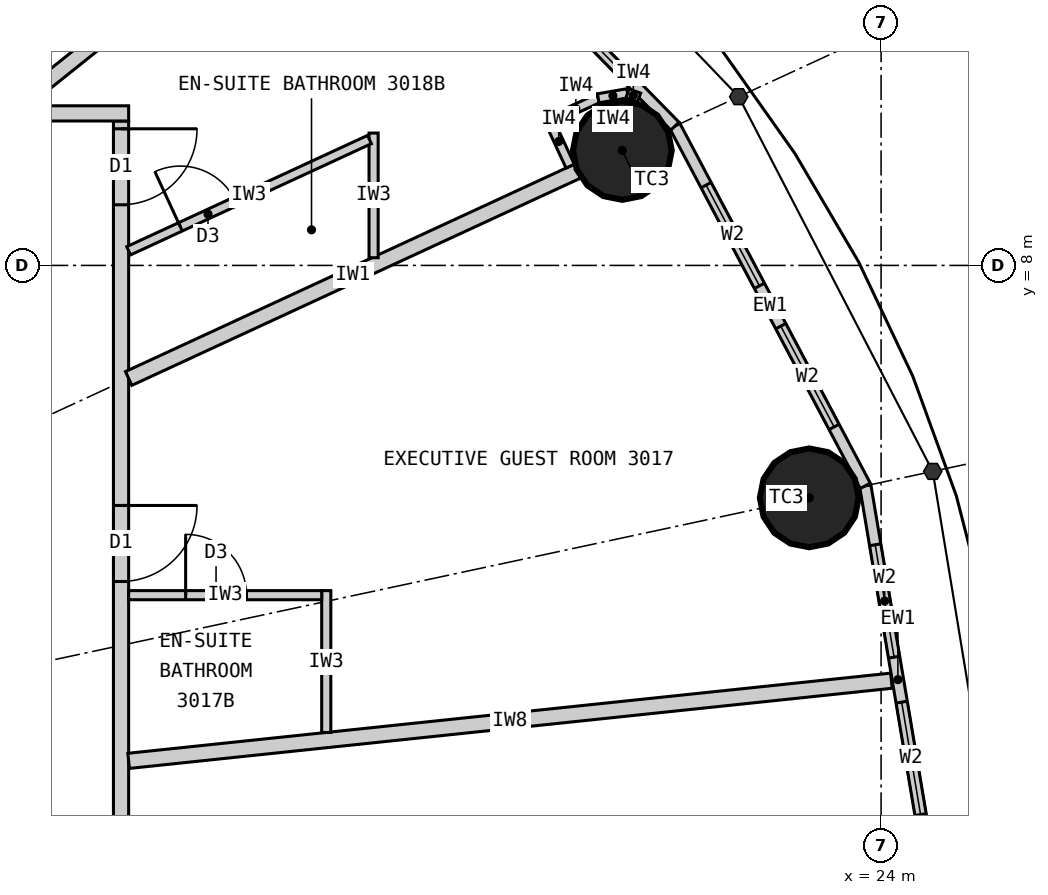
"""IFC4 building model, lengths in metres.
Left out: names, types, materials, properties, quantities, classifications, styles, units other than length and angle.
Written with IfcOpenShell. Run it as: python <this file> out.ifc"""

import sys

from ifc_helpers import new_model, si_unit, direction, frame, frame_2d, origin, origin_2d, place, context, subcontext, project, spatial, rectangle, circle, extrude, element, fill, save


model = new_model("IFC4")
c1 = context("Model", 3, precision=1e-05, world=origin(), true_north=direction((0.0, 1.0)))
c2 = subcontext(c1, "Body", "Model", "MODEL_VIEW")
j1 = project(units=[si_unit("LENGTHUNIT", "METRE"), si_unit("PLANEANGLEUNIT", "RADIAN")], contexts=[c1])
p1 = place(None, origin())
s1 = spatial("IfcSite", under=j1, at=p1, CompositionType="ELEMENT")
p2 = place(p1, origin())
s2 = spatial("IfcBuilding", under=s1, at=p2, CompositionType="ELEMENT")
p3 = place(p2, frame((0.0, 0.0, 118.8)))
s3 = spatial("IfcBuildingStorey", under=s2, at=p3, CompositionType="ELEMENT", Elevation=118.8)
for number, where, z_axis, x_axis in (
    (1, (23.055, 4.942, 0.0), (0.0, 0.0, 1.0), (1.0, 0.0, 0.0)),
    (2, (20.596, 9.513, 0.0), (0.0, 0.0, 1.0), (1.0, 0.0, 0.0)),
):
    element("IfcColumn", number, at=place(p3, frame(where, z_axis=z_axis, x_axis=x_axis)), inside=s3, PredefinedType="COLUMN", context=c2, shape_type="SweptSolid", body=[
        extrude(circle(Radius=0.65, at=origin_2d()), origin(), (0.0, 0.0, 1.0), 3.3),
    ])
p4 = place(p3, frame((24.65, 0.0, 0.0), z_axis=(0.0, 0.0, 1.0), x_axis=(-0.165883894218, 0.986145290329, 0.0)))
e3 = element("IfcWall", 3, at=p4, inside=s3, PredefinedType="ELEMENTEDWALL", context=c2, shape_type="SweptSolid", body=[
    extrude(rectangle(XDim=5.172, YDim=0.15, at=frame_2d((2.586, 0.0))), origin(), (0.0, 0.0, 1.0), 3.12),
])
p5 = place(p4, frame((0.786, 0.0, 0.9)))
e4 = element("IfcOpeningElement", 4, at=p5, cuts=e3, PredefinedType="OPENING", context=c2, shape_type="SweptSolid", body=[
    extrude(rectangle(XDim=1.5, YDim=1.9, at=frame_2d((0.75, 0.95))), frame((0.0, 0.085, 0.0), z_axis=(0.0, -1.0, 0.0), x_axis=(1.0, 0.0, 0.0)), (0.0, 0.0, 1.0), 0.17),
])
p6 = place(p4, frame((2.886, 0.0, 0.9)))
e5 = element("IfcOpeningElement", 5, at=p6, cuts=e3, PredefinedType="OPENING", context=c2, shape_type="SweptSolid", body=[
    extrude(rectangle(XDim=1.5, YDim=1.9, at=frame_2d((0.75, 0.95))), frame((0.0, 0.085, 0.0), z_axis=(0.0, -1.0, 0.0), x_axis=(1.0, 0.0, 0.0)), (0.0, 0.0, 1.0), 0.17),
])
p7 = place(p3, frame((23.792, 5.1, 0.0), z_axis=(0.0, 0.0, 1.0), x_axis=(-0.467814388454, 0.883826735257, 0.0)))
e6 = element("IfcWall", 6, at=p7, inside=s3, PredefinedType="ELEMENTEDWALL", context=c2, shape_type="SweptSolid", body=[
    extrude(rectangle(XDim=5.354, YDim=0.15, at=frame_2d((2.677, 0.0))), origin(), (0.0, 0.0, 1.0), 3.12),
])
p8 = place(p7, frame((0.877, 0.0, 0.9)))
e7 = element("IfcOpeningElement", 7, at=p8, cuts=e6, PredefinedType="OPENING", context=c2, shape_type="SweptSolid", body=[
    extrude(rectangle(XDim=1.5, YDim=1.9, at=frame_2d((0.75, 0.95))), frame((0.0, 0.085, 0.0), z_axis=(0.0, -1.0, 0.0), x_axis=(1.0, 0.0, 0.0)), (0.0, 0.0, 1.0), 0.17),
])
p9 = place(p7, frame((2.977, 0.0, 0.9)))
e8 = element("IfcOpeningElement", 8, at=p9, cuts=e6, PredefinedType="OPENING", context=c2, shape_type="SweptSolid", body=[
    extrude(rectangle(XDim=1.5, YDim=1.9, at=frame_2d((0.75, 0.95))), frame((0.0, 0.085, 0.0), z_axis=(0.0, -1.0, 0.0), x_axis=(1.0, 0.0, 0.0)), (0.0, 0.0, 1.0), 0.17),
])
p10 = place(p3, frame((21.287, 9.832, 0.0), z_axis=(0.0, 0.0, 1.0), x_axis=(-0.700136650834, 0.714008872605, 0.0)))
e9 = element("IfcWall", 9, at=p10, inside=s3, PredefinedType="ELEMENTEDWALL", context=c2, shape_type="SweptSolid", body=[
    extrude(rectangle(XDim=5.649, YDim=0.15, at=frame_2d((2.825, 0.0))), origin(), (0.0, 0.0, 1.0), 3.12),
])
p11 = place(p10, frame((1.025, 0.0, 0.9)))
e10 = element("IfcOpeningElement", 10, at=p11, cuts=e9, PredefinedType="OPENING", context=c2, shape_type="SweptSolid", body=[
    extrude(rectangle(XDim=1.5, YDim=1.9, at=frame_2d((0.75, 0.95))), frame((0.0, 0.085, 0.0), z_axis=(0.0, -1.0, 0.0), x_axis=(1.0, 0.0, 0.0)), (0.0, 0.0, 1.0), 0.17),
])
p12 = place(p10, frame((3.125, 0.0, 0.9)))
e11 = element("IfcOpeningElement", 11, at=p12, cuts=e9, PredefinedType="OPENING", context=c2, shape_type="SweptSolid", body=[
    extrude(rectangle(XDim=1.5, YDim=1.9, at=frame_2d((0.75, 0.95))), frame((0.0, 0.085, 0.0), z_axis=(0.0, -1.0, 0.0), x_axis=(1.0, 0.0, 0.0)), (0.0, 0.0, 1.0), 0.17),
])
p13 = place(p3, frame((14.0, -9.9, 0.0), z_axis=(0.0, 0.0, 1.0), x_axis=(0.0, 1.0, 0.0)))
e12 = element("IfcWall", 12, at=p13, inside=s3, PredefinedType="PARTITIONING", context=c2, shape_type="SweptSolid", body=[
    extrude(rectangle(XDim=19.8, YDim=0.2, at=frame_2d((9.9, 0.0))), origin(), (0.0, 0.0, 1.0), 3.12),
])
p14 = place(p13, frame((2.478, 0.0, 0.0)))
e13 = element("IfcOpeningElement", 13, at=p14, cuts=e12, PredefinedType="OPENING", context=c2, shape_type="SweptSolid", body=[
    extrude(rectangle(XDim=1.0, YDim=2.2, at=frame_2d((0.5, 1.1))), frame((0.0, 0.11, 0.0), z_axis=(0.0, -1.0, 0.0), x_axis=(1.0, 0.0, 0.0)), (0.0, 0.0, 1.0), 0.22),
])
p15 = place(p13, frame((8.838, 0.0, 0.0)))
e14 = element("IfcOpeningElement", 14, at=p15, cuts=e12, PredefinedType="OPENING", context=c2, shape_type="SweptSolid", body=[
    extrude(rectangle(XDim=1.0, YDim=2.2, at=frame_2d((0.5, 1.1))), frame((0.0, 0.11, 0.0), z_axis=(0.0, -1.0, 0.0), x_axis=(1.0, 0.0, 0.0)), (0.0, 0.0, 1.0), 0.22),
])
p16 = place(p13, frame((13.742, 0.0, 0.0)))
e15 = element("IfcOpeningElement", 15, at=p16, cuts=e12, PredefinedType="OPENING", context=c2, shape_type="SweptSolid", body=[
    extrude(rectangle(XDim=1.0, YDim=2.2, at=frame_2d((0.5, 1.1))), frame((0.0, 0.11, 0.0), z_axis=(0.0, -1.0, 0.0), x_axis=(1.0, 0.0, 0.0)), (0.0, 0.0, 1.0), 0.22),
])
p17 = place(p13, frame((18.698, 0.0, 0.0)))
e16 = element("IfcOpeningElement", 16, at=p17, cuts=e12, PredefinedType="OPENING", context=c2, shape_type="SweptSolid", body=[
    extrude(rectangle(XDim=1.0, YDim=2.2, at=frame_2d((0.5, 1.1))), frame((0.0, 0.11, 0.0), z_axis=(0.0, -1.0, 0.0), x_axis=(1.0, 0.0, 0.0)), (0.0, 0.0, 1.0), 0.22),
])
p18 = place(p3, frame((3.283, 10.0, 0.0), z_axis=(0.0, 0.0, 1.0), x_axis=(1.0, 0.0, 0.0)))
e17 = element("IfcWall", 17, at=p18, inside=s3, PredefinedType="PARTITIONING", context=c2, shape_type="SweptSolid", body=[
    extrude(rectangle(XDim=10.817, YDim=0.2, at=frame_2d((5.409, 0.0))), origin(), (0.0, 0.0, 1.0), 3.12),
])
p19 = place(p18, frame((6.482, 0.0, 0.0)))
e18 = element("IfcOpeningElement", 18, at=p19, cuts=e17, PredefinedType="OPENING", context=c2, shape_type="SweptSolid", body=[
    extrude(rectangle(XDim=1.0, YDim=2.2, at=frame_2d((0.5, 1.1))), frame((0.0, 0.11, 0.0), z_axis=(0.0, -1.0, 0.0), x_axis=(1.0, 0.0, 0.0)), (0.0, 0.0, 1.0), 0.22),
])
p20 = place(p3, frame((14.1, 1.482, 0.0), z_axis=(0.0, 0.0, 1.0), x_axis=(0.994523202615, 0.104516024894, 0.0)))
e19 = element("IfcWall", 19, at=p20, inside=s3, PredefinedType="PARTITIONING", context=c2, shape_type="SweptSolid", body=[
    extrude(rectangle(XDim=10.091, YDim=0.2, at=frame_2d((5.045, 0.0))), origin(), (0.0, 0.0, 1.0), 2.47),
])
p21 = place(p3, frame((14.1, 6.512, 0.0), z_axis=(0.0, 0.0, 1.0), x_axis=(0.907833019998, 0.419331858797, 0.0)))
e20 = element("IfcWall", 20, at=p21, inside=s3, PredefinedType="PARTITIONING", context=c2, shape_type="SweptSolid", body=[
    extrude(rectangle(XDim=6.505, YDim=0.2, at=frame_2d((3.252, 0.0))), origin(), (0.0, 0.0, 1.0), 2.27),
])
p22 = place(p3, frame((12.625, 10.1, 0.0), z_axis=(0.0, 0.0, 1.0), x_axis=(0.780863644897, 0.624701503182, 0.0)))
e21 = element("IfcWall", 21, at=p22, inside=s3, PredefinedType="PARTITIONING", context=c2, shape_type="SweptSolid", body=[
    extrude(rectangle(XDim=4.612, YDim=0.2, at=frame_2d((2.306, 0.0))), origin(), (0.0, 0.0, 1.0), 2.37),
])
p23 = place(p3, frame((16.7, 1.855, 0.0), z_axis=(0.0, 0.0, 1.0), x_axis=(0.0, 1.0, 0.0)))
e22 = element("IfcWall", 22, at=p23, inside=s3, PredefinedType="PARTITIONING", context=c2, shape_type="SweptSolid", body=[
    extrude(rectangle(XDim=1.867, YDim=0.12, at=frame_2d((0.933, 0.0))), origin(), (0.0, 0.0, 1.0), 3.12),
])
p24 = place(p3, frame((14.1, 3.662, 0.0), z_axis=(0.0, 0.0, 1.0), x_axis=(1.0, 0.0, 0.0)))
e23 = element("IfcWall", 23, at=p24, inside=s3, PredefinedType="PARTITIONING", context=c2, shape_type="SweptSolid", body=[
    extrude(rectangle(XDim=2.54, YDim=0.12, at=frame_2d((1.27, 0.0))), origin(), (0.0, 0.0, 1.0), 2.37),
])
p25 = place(p24, frame((0.75, 0.0, 0.0)))
e24 = element("IfcOpeningElement", 24, at=p25, cuts=e23, PredefinedType="OPENING", context=c2, shape_type="SweptSolid", body=[
    extrude(rectangle(XDim=0.8, YDim=2.1, at=frame_2d((0.4, 1.05))), frame((0.0, 0.07, 0.0), z_axis=(0.0, -1.0, 0.0), x_axis=(1.0, 0.0, 0.0)), (0.0, 0.0, 1.0), 0.14),
])
p26 = place(p3, frame((17.323, 8.101, 0.0), z_axis=(0.0, 0.0, 1.0), x_axis=(0.0, 1.0, 0.0)))
e25 = element("IfcWall", 25, at=p26, inside=s3, PredefinedType="PARTITIONING", context=c2, shape_type="SweptSolid", body=[
    extrude(rectangle(XDim=1.64, YDim=0.12, at=frame_2d((0.82, 0.0))), origin(), (0.0, 0.0, 1.0), 3.12),
])
p27 = place(p3, frame((14.1, 8.193, 0.0), z_axis=(0.0, 0.0, 1.0), x_axis=(0.907836493557, 0.419324338628, 0.0)))
e26 = element("IfcWall", 26, at=p27, inside=s3, PredefinedType="PARTITIONING", context=c2, shape_type="SweptSolid", body=[
    extrude(rectangle(XDim=3.49, YDim=0.12, at=frame_2d((1.745, 0.0))), origin(), (0.0, 0.0, 1.0), 3.12),
])
p28 = place(p27, frame((0.75, 0.0, 0.0)))
e27 = element("IfcOpeningElement", 27, at=p28, cuts=e26, PredefinedType="OPENING", context=c2, shape_type="SweptSolid", body=[
    extrude(rectangle(XDim=0.8, YDim=2.1, at=frame_2d((0.4, 1.05))), frame((0.0, 0.07, 0.0), z_axis=(0.0, -1.0, 0.0), x_axis=(1.0, 0.0, 0.0)), (0.0, 0.0, 1.0), 0.14),
])
p29 = place(p3, frame((19.909, 9.306, 0.0), z_axis=(0.0, 0.0, 1.0), x_axis=(-0.419296148934, 0.90784951368, 0.0)))
e28 = element("IfcWall", 28, at=p29, inside=s3, PredefinedType="PARTITIONING", context=c2, shape_type="SweptSolid", body=[
    extrude(rectangle(XDim=0.716, YDim=0.12, at=frame_2d((0.358, 0.0))), origin(), (0.0, 0.0, 1.0), 3.12),
])
p30 = place(p3, frame((19.689, 9.926, 0.0), z_axis=(0.0, 0.0, 1.0), x_axis=(0.907893409272, 0.419201094227, 0.0)))
e29 = element("IfcWall", 29, at=p30, inside=s3, PredefinedType="PARTITIONING", context=c2, shape_type="SweptSolid", body=[
    extrude(rectangle(XDim=0.65, YDim=0.12, at=frame_2d((0.325, 0.0))), origin(), (0.0, 0.0, 1.0), 3.12),
])
p31 = place(p3, frame((20.279, 10.199, 0.0), z_axis=(0.0, 0.0, 1.0), x_axis=(0.985380740712, 0.170366651181, 0.0)))
e30 = element("IfcWall", 30, at=p31, inside=s3, PredefinedType="PARTITIONING", context=c2, shape_type="SweptSolid", body=[
    extrude(rectangle(XDim=0.391, YDim=0.12, at=frame_2d((0.196, 0.0))), origin(), (0.0, 0.0, 1.0), 3.12),
])
p32 = place(p3, frame((20.664, 10.265, 0.0), z_axis=(0.0, 0.0, 1.0), x_axis=(0.938058651481, -0.346476501918, 0.0)))
e31 = element("IfcWall", 31, at=p32, inside=s3, PredefinedType="PARTITIONING", context=c2, shape_type="SweptSolid", body=[
    extrude(rectangle(XDim=0.161, YDim=0.12, at=frame_2d((0.081, 0.0))), origin(), (0.0, 0.0, 1.0), 3.12),
])
p33 = place(p5, origin())
e32 = element("IfcWindow", 32, at=p33, inside=s3, PartitioningType="SINGLE_PANEL", PredefinedType="WINDOW", context=c2, shape_type="SweptSolid", body=[
    extrude(rectangle(XDim=1.5, YDim=1.9, at=frame_2d((0.75, 0.95))), frame((0.0, 0.03, 0.0), z_axis=(0.0, -1.0, 0.0), x_axis=(1.0, 0.0, 0.0)), (0.0, 0.0, 1.0), 0.06),
])
fill(e4, e32)
p34 = place(p6, origin())
e33 = element("IfcWindow", 33, at=p34, inside=s3, PartitioningType="SINGLE_PANEL", PredefinedType="WINDOW", context=c2, shape_type="SweptSolid", body=[
    extrude(rectangle(XDim=1.5, YDim=1.9, at=frame_2d((0.75, 0.95))), frame((0.0, 0.03, 0.0), z_axis=(0.0, -1.0, 0.0), x_axis=(1.0, 0.0, 0.0)), (0.0, 0.0, 1.0), 0.06),
])
fill(e5, e33)
p35 = place(p8, origin())
e34 = element("IfcWindow", 34, at=p35, inside=s3, PartitioningType="SINGLE_PANEL", PredefinedType="WINDOW", context=c2, shape_type="SweptSolid", body=[
    extrude(rectangle(XDim=1.5, YDim=1.9, at=frame_2d((0.75, 0.95))), frame((0.0, 0.03, 0.0), z_axis=(0.0, -1.0, 0.0), x_axis=(1.0, 0.0, 0.0)), (0.0, 0.0, 1.0), 0.06),
])
fill(e7, e34)
p36 = place(p9, origin())
e35 = element("IfcWindow", 35, at=p36, inside=s3, PartitioningType="SINGLE_PANEL", PredefinedType="WINDOW", context=c2, shape_type="SweptSolid", body=[
    extrude(rectangle(XDim=1.5, YDim=1.9, at=frame_2d((0.75, 0.95))), frame((0.0, 0.03, 0.0), z_axis=(0.0, -1.0, 0.0), x_axis=(1.0, 0.0, 0.0)), (0.0, 0.0, 1.0), 0.06),
])
fill(e8, e35)
p37 = place(p11, origin())
e36 = element("IfcWindow", 36, at=p37, inside=s3, PartitioningType="SINGLE_PANEL", PredefinedType="WINDOW", context=c2, shape_type="SweptSolid", body=[
    extrude(rectangle(XDim=1.5, YDim=1.9, at=frame_2d((0.75, 0.95))), frame((0.0, 0.03, 0.0), z_axis=(0.0, -1.0, 0.0), x_axis=(1.0, 0.0, 0.0)), (0.0, 0.0, 1.0), 0.06),
])
fill(e10, e36)
p38 = place(p25, origin())
e37 = element("IfcDoor", 37, at=p38, inside=s3, OperationType="SINGLE_SWING_LEFT", PredefinedType="DOOR", context=c2, shape_type="SweptSolid", body=[
    extrude(rectangle(XDim=0.8, YDim=2.1, at=frame_2d((0.4, 1.05))), frame((0.0, 0.025, 0.0), z_axis=(0.0, -1.0, 0.0), x_axis=(1.0, 0.0, 0.0)), (0.0, 0.0, 1.0), 0.05),
])
fill(e24, e37)
p39 = place(p16, origin())
e38 = element("IfcDoor", 38, at=p39, inside=s3, OperationType="SINGLE_SWING_RIGHT", PredefinedType="DOOR", context=c2, shape_type="SweptSolid", body=[
    extrude(rectangle(XDim=1.0, YDim=2.2, at=frame_2d((0.5, 1.1))), frame((0.0, 0.025, 0.0), z_axis=(0.0, -1.0, 0.0), x_axis=(1.0, 0.0, 0.0)), (0.0, 0.0, 1.0), 0.05),
])
fill(e15, e38)
p40 = place(p28, origin())
e39 = element("IfcDoor", 39, at=p40, inside=s3, OperationType="SINGLE_SWING_LEFT", PredefinedType="DOOR", context=c2, shape_type="SweptSolid", body=[
    extrude(rectangle(XDim=0.8, YDim=2.1, at=frame_2d((0.4, 1.05))), frame((0.0, 0.025, 0.0), z_axis=(0.0, -1.0, 0.0), x_axis=(1.0, 0.0, 0.0)), (0.0, 0.0, 1.0), 0.05),
])
fill(e27, e39)
p41 = place(p17, origin())
e40 = element("IfcDoor", 40, at=p41, inside=s3, OperationType="SINGLE_SWING_RIGHT", PredefinedType="DOOR", context=c2, shape_type="SweptSolid", body=[
    extrude(rectangle(XDim=1.0, YDim=2.2, at=frame_2d((0.5, 1.1))), frame((0.0, 0.025, 0.0), z_axis=(0.0, -1.0, 0.0), x_axis=(1.0, 0.0, 0.0)), (0.0, 0.0, 1.0), 0.05),
])
fill(e16, e40)
save(model, sys.argv[1])
